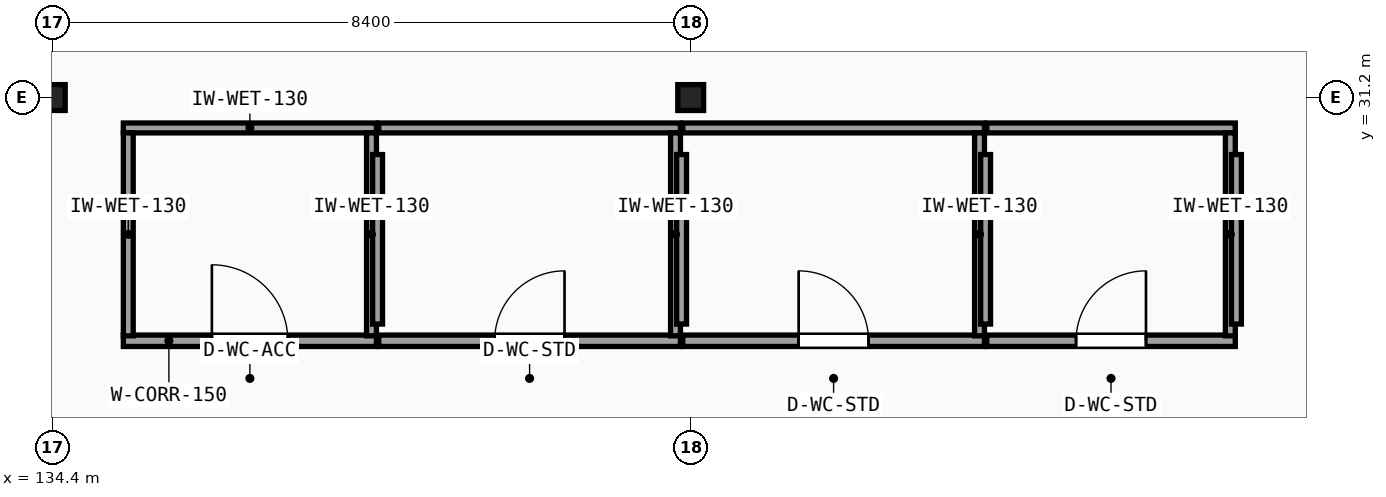
"""IFC4 building model, lengths in metres.
Left out: names, types, materials, properties, quantities, classifications, styles, units other than length and angle.
Written with IfcOpenShell. Run it as: python <this file> out.ifc"""

import sys

from ifc_helpers import new_model, si_unit, direction, frame, frame_2d, origin, origin_2d, place, context, subcontext, project, spatial, rectangle, i_section, extrude, element, fill, save


model = new_model("IFC4")
c1 = context("Model", 3, precision=1e-05, world=origin(), true_north=direction((0.0, 1.0)))
c2 = subcontext(c1, "Body", "Model", "MODEL_VIEW")
j1 = project(units=[si_unit("LENGTHUNIT", "METRE"), si_unit("PLANEANGLEUNIT", "RADIAN")], contexts=[c1])
p1 = place(None, origin())
s1 = spatial("IfcSite", under=j1, at=p1, CompositionType="ELEMENT")
p2 = place(p1, origin())
s2 = spatial("IfcBuilding", under=s1, at=p2, CompositionType="ELEMENT")
p3 = place(p2, frame((0.0, 0.0, 14.85)))
s3 = spatial("IfcBuildingStorey", under=s2, at=p3, CompositionType="ELEMENT", Elevation=14.85)
for number, where, z_axis, x_axis in (
    (1, (134.4, 31.2, 0.0), (0.0, 0.0, 1.0), (1.0, 0.0, 0.0)),
    (2, (142.8, 31.2, 0.0), (0.0, 0.0, 1.0), (1.0, 0.0, 0.0)),
):
    element("IfcColumn", number, at=place(p3, frame(where, z_axis=z_axis, x_axis=x_axis)), inside=s3, PredefinedType="COLUMN", context=c2, shape_type="SweptSolid", body=[
        extrude(i_section(OverallWidth=0.3, OverallDepth=0.34, WebThickness=0.012, FlangeThickness=0.021, FilletRadius=0.027, at=origin_2d()), origin(), (0.0, 0.0, 1.0), 4.05),
    ])
p4 = place(p3, frame((135.335, 28.0, 0.0), z_axis=(0.0, 0.0, 1.0), x_axis=(1.0, 0.0, 0.0)))
e3 = element("IfcWall", 3, at=p4, inside=s3, PredefinedType="PARTITIONING", context=c2, shape_type="SweptSolid", body=[
    extrude(rectangle(XDim=3.33, YDim=0.15, at=frame_2d((1.665, 0.0))), origin(), (0.0, 0.0, 1.0), 3.77),
])
p5 = place(p4, frame((1.165, 0.0, 0.0)))
e4 = element("IfcOpeningElement", 4, at=p5, cuts=e3, PredefinedType="OPENING", context=c2, shape_type="SweptSolid", body=[
    extrude(rectangle(XDim=1.0, YDim=2.15, at=frame_2d((0.5, 1.075))), frame((0.0, 0.085, 0.0), z_axis=(0.0, -1.0, 0.0), x_axis=(1.0, 0.0, 0.0)), (0.0, 0.0, 1.0), 0.17),
])
p6 = place(p3, frame((135.335, 30.8, 0.0), z_axis=(0.0, 0.0, 1.0), x_axis=(1.0, 0.0, 0.0)))
e5 = element("IfcWall", 5, at=p6, inside=s3, PredefinedType="PARTITIONING", context=c2, shape_type="SweptSolid", body=[
    extrude(rectangle(XDim=3.33, YDim=0.13, at=frame_2d((1.665, 0.0))), origin(), (0.0, 0.0, 1.0), 3.77),
])
for number, where, z_axis, x_axis in (
    (6, (135.4, 28.065, 0.0), (0.0, 0.0, 1.0), (0.0, 1.0, 0.0)),
    (7, (138.6, 28.065, 0.0), (0.0, 0.0, 1.0), (0.0, 1.0, 0.0)),
):
    element("IfcWall", number, at=place(p3, frame(where, z_axis=z_axis, x_axis=x_axis)), inside=s3, PredefinedType="PARTITIONING", context=c2, shape_type="SweptSolid", body=[
        extrude(rectangle(XDim=2.67, YDim=0.13, at=frame_2d((1.335, 0.0))), origin(), (0.0, 0.0, 1.0), 3.77),
    ])
p7 = place(p3, frame((138.68, 28.22, 0.0), z_axis=(0.0, 0.0, 1.0), x_axis=(0.0, 1.0, 0.0)))
e8 = element("IfcWall", 8, at=p7, inside=s3, PredefinedType="PARTITIONING", context=c2, shape_type="SweptSolid", body=[
    extrude(rectangle(XDim=2.23, YDim=0.13, at=frame_2d((1.115, 0.0))), origin(), (0.0, 0.0, 1.0), 3.77),
])
p8 = place(p3, frame((138.695, 28.0, 0.0), z_axis=(0.0, 0.0, 1.0), x_axis=(1.0, 0.0, 0.0)))
e9 = element("IfcWall", 9, at=p8, inside=s3, PredefinedType="PARTITIONING", context=c2, shape_type="SweptSolid", body=[
    extrude(rectangle(XDim=3.97, YDim=0.15, at=frame_2d((1.985, 0.0))), origin(), (0.0, 0.0, 1.0), 3.52),
])
p9 = place(p8, frame((1.525, 0.0, 0.0)))
e10 = element("IfcOpeningElement", 10, at=p9, cuts=e9, PredefinedType="OPENING", context=c2, shape_type="SweptSolid", body=[
    extrude(rectangle(XDim=0.92, YDim=2.15, at=frame_2d((0.46, 1.075))), frame((0.0, 0.085, 0.0), z_axis=(0.0, -1.0, 0.0), x_axis=(1.0, 0.0, 0.0)), (0.0, 0.0, 1.0), 0.17),
])
p10 = place(p3, frame((138.695, 30.8, 0.0), z_axis=(0.0, 0.0, 1.0), x_axis=(1.0, 0.0, 0.0)))
e11 = element("IfcWall", 11, at=p10, inside=s3, PredefinedType="PARTITIONING", context=c2, shape_type="SweptSolid", body=[
    extrude(rectangle(XDim=3.97, YDim=0.13, at=frame_2d((1.985, 0.0))), origin(), (0.0, 0.0, 1.0), 3.52),
])
p11 = place(p3, frame((142.6, 28.065, 0.0), z_axis=(0.0, 0.0, 1.0), x_axis=(0.0, 1.0, 0.0)))
e12 = element("IfcWall", 12, at=p11, inside=s3, PredefinedType="PARTITIONING", context=c2, shape_type="SweptSolid", body=[
    extrude(rectangle(XDim=2.67, YDim=0.13, at=frame_2d((1.335, 0.0))), origin(), (0.0, 0.0, 1.0), 3.52),
])
p12 = place(p3, frame((142.68, 28.22, 0.0), z_axis=(0.0, 0.0, 1.0), x_axis=(0.0, 1.0, 0.0)))
e13 = element("IfcWall", 13, at=p12, inside=s3, PredefinedType="PARTITIONING", context=c2, shape_type="SweptSolid", body=[
    extrude(rectangle(XDim=2.23, YDim=0.13, at=frame_2d((1.115, 0.0))), origin(), (0.0, 0.0, 1.0), 3.52),
])
p13 = place(p3, frame((142.695, 28.0, 0.0), z_axis=(0.0, 0.0, 1.0), x_axis=(1.0, 0.0, 0.0)))
e14 = element("IfcWall", 14, at=p13, inside=s3, PredefinedType="PARTITIONING", context=c2, shape_type="SweptSolid", body=[
    extrude(rectangle(XDim=3.97, YDim=0.15, at=frame_2d((1.985, 0.0))), origin(), (0.0, 0.0, 1.0), 3.52),
])
p14 = place(p13, frame((1.525, 0.0, 0.0)))
e15 = element("IfcOpeningElement", 15, at=p14, cuts=e14, PredefinedType="OPENING", context=c2, shape_type="SweptSolid", body=[
    extrude(rectangle(XDim=0.92, YDim=2.15, at=frame_2d((0.46, 1.075))), frame((0.0, 0.085, 0.0), z_axis=(0.0, -1.0, 0.0), x_axis=(1.0, 0.0, 0.0)), (0.0, 0.0, 1.0), 0.17),
])
p15 = place(p3, frame((142.695, 30.8, 0.0), z_axis=(0.0, 0.0, 1.0), x_axis=(1.0, 0.0, 0.0)))
e16 = element("IfcWall", 16, at=p15, inside=s3, PredefinedType="PARTITIONING", context=c2, shape_type="SweptSolid", body=[
    extrude(rectangle(XDim=3.97, YDim=0.13, at=frame_2d((1.985, 0.0))), origin(), (0.0, 0.0, 1.0), 3.52),
])
p16 = place(p3, frame((146.6, 28.065, 0.0), z_axis=(0.0, 0.0, 1.0), x_axis=(0.0, 1.0, 0.0)))
e17 = element("IfcWall", 17, at=p16, inside=s3, PredefinedType="PARTITIONING", context=c2, shape_type="SweptSolid", body=[
    extrude(rectangle(XDim=2.67, YDim=0.13, at=frame_2d((1.335, 0.0))), origin(), (0.0, 0.0, 1.0), 3.77),
])
p17 = place(p3, frame((146.68, 28.22, 0.0), z_axis=(0.0, 0.0, 1.0), x_axis=(0.0, 1.0, 0.0)))
e18 = element("IfcWall", 18, at=p17, inside=s3, PredefinedType="PARTITIONING", context=c2, shape_type="SweptSolid", body=[
    extrude(rectangle(XDim=2.23, YDim=0.13, at=frame_2d((1.115, 0.0))), origin(), (0.0, 0.0, 1.0), 3.77),
])
p18 = place(p3, frame((146.695, 28.0, 0.0), z_axis=(0.0, 0.0, 1.0), x_axis=(1.0, 0.0, 0.0)))
e19 = element("IfcWall", 19, at=p18, inside=s3, PredefinedType="PARTITIONING", context=c2, shape_type="SweptSolid", body=[
    extrude(rectangle(XDim=3.27, YDim=0.15, at=frame_2d((1.635, 0.0))), origin(), (0.0, 0.0, 1.0), 3.77),
])
p19 = place(p18, frame((1.175, 0.0, 0.0)))
e20 = element("IfcOpeningElement", 20, at=p19, cuts=e19, PredefinedType="OPENING", context=c2, shape_type="SweptSolid", body=[
    extrude(rectangle(XDim=0.92, YDim=2.15, at=frame_2d((0.46, 1.075))), frame((0.0, 0.085, 0.0), z_axis=(0.0, -1.0, 0.0), x_axis=(1.0, 0.0, 0.0)), (0.0, 0.0, 1.0), 0.17),
])
p20 = place(p3, frame((146.695, 30.8, 0.0), z_axis=(0.0, 0.0, 1.0), x_axis=(1.0, 0.0, 0.0)))
e21 = element("IfcWall", 21, at=p20, inside=s3, PredefinedType="PARTITIONING", context=c2, shape_type="SweptSolid", body=[
    extrude(rectangle(XDim=3.27, YDim=0.13, at=frame_2d((1.635, 0.0))), origin(), (0.0, 0.0, 1.0), 3.77),
])
p21 = place(p3, frame((149.9, 28.065, 0.0), z_axis=(0.0, 0.0, 1.0), x_axis=(0.0, 1.0, 0.0)))
e22 = element("IfcWall", 22, at=p21, inside=s3, PredefinedType="PARTITIONING", context=c2, shape_type="SweptSolid", body=[
    extrude(rectangle(XDim=2.67, YDim=0.13, at=frame_2d((1.335, 0.0))), origin(), (0.0, 0.0, 1.0), 3.77),
])
p22 = place(p3, frame((149.98, 28.22, 0.0), z_axis=(0.0, 0.0, 1.0), x_axis=(0.0, 1.0, 0.0)))
e23 = element("IfcWall", 23, at=p22, inside=s3, PredefinedType="PARTITIONING", context=c2, shape_type="SweptSolid", body=[
    extrude(rectangle(XDim=2.23, YDim=0.13, at=frame_2d((1.115, 0.0))), origin(), (0.0, 0.0, 1.0), 3.77),
])
p23 = place(p5, origin())
e24 = element("IfcDoor", 24, at=p23, inside=s3, OperationType="SINGLE_SWING_LEFT", PredefinedType="DOOR", context=c2, shape_type="SweptSolid", body=[
    extrude(rectangle(XDim=1.0, YDim=2.15, at=frame_2d((0.5, 1.075))), frame((0.0, 0.025, 0.0), z_axis=(0.0, -1.0, 0.0), x_axis=(1.0, 0.0, 0.0)), (0.0, 0.0, 1.0), 0.05),
])
fill(e4, e24)
p24 = place(p9, origin())
e25 = element("IfcDoor", 25, at=p24, inside=s3, OperationType="SINGLE_SWING_RIGHT", PredefinedType="DOOR", context=c2, shape_type="SweptSolid", body=[
    extrude(rectangle(XDim=0.92, YDim=2.15, at=frame_2d((0.46, 1.075))), frame((0.0, 0.025, 0.0), z_axis=(0.0, -1.0, 0.0), x_axis=(1.0, 0.0, 0.0)), (0.0, 0.0, 1.0), 0.05),
])
fill(e10, e25)
p25 = place(p14, origin())
e26 = element("IfcDoor", 26, at=p25, inside=s3, OperationType="SINGLE_SWING_LEFT", PredefinedType="DOOR", context=c2, shape_type="SweptSolid", body=[
    extrude(rectangle(XDim=0.92, YDim=2.15, at=frame_2d((0.46, 1.075))), frame((0.0, 0.025, 0.0), z_axis=(0.0, -1.0, 0.0), x_axis=(1.0, 0.0, 0.0)), (0.0, 0.0, 1.0), 0.05),
])
fill(e15, e26)
p26 = place(p19, origin())
e27 = element("IfcDoor", 27, at=p26, inside=s3, OperationType="SINGLE_SWING_RIGHT", PredefinedType="DOOR", context=c2, shape_type="SweptSolid", body=[
    extrude(rectangle(XDim=0.92, YDim=2.15, at=frame_2d((0.46, 1.075))), frame((0.0, 0.025, 0.0), z_axis=(0.0, -1.0, 0.0), x_axis=(1.0, 0.0, 0.0)), (0.0, 0.0, 1.0), 0.05),
])
fill(e20, e27)
save(model, sys.argv[1])
